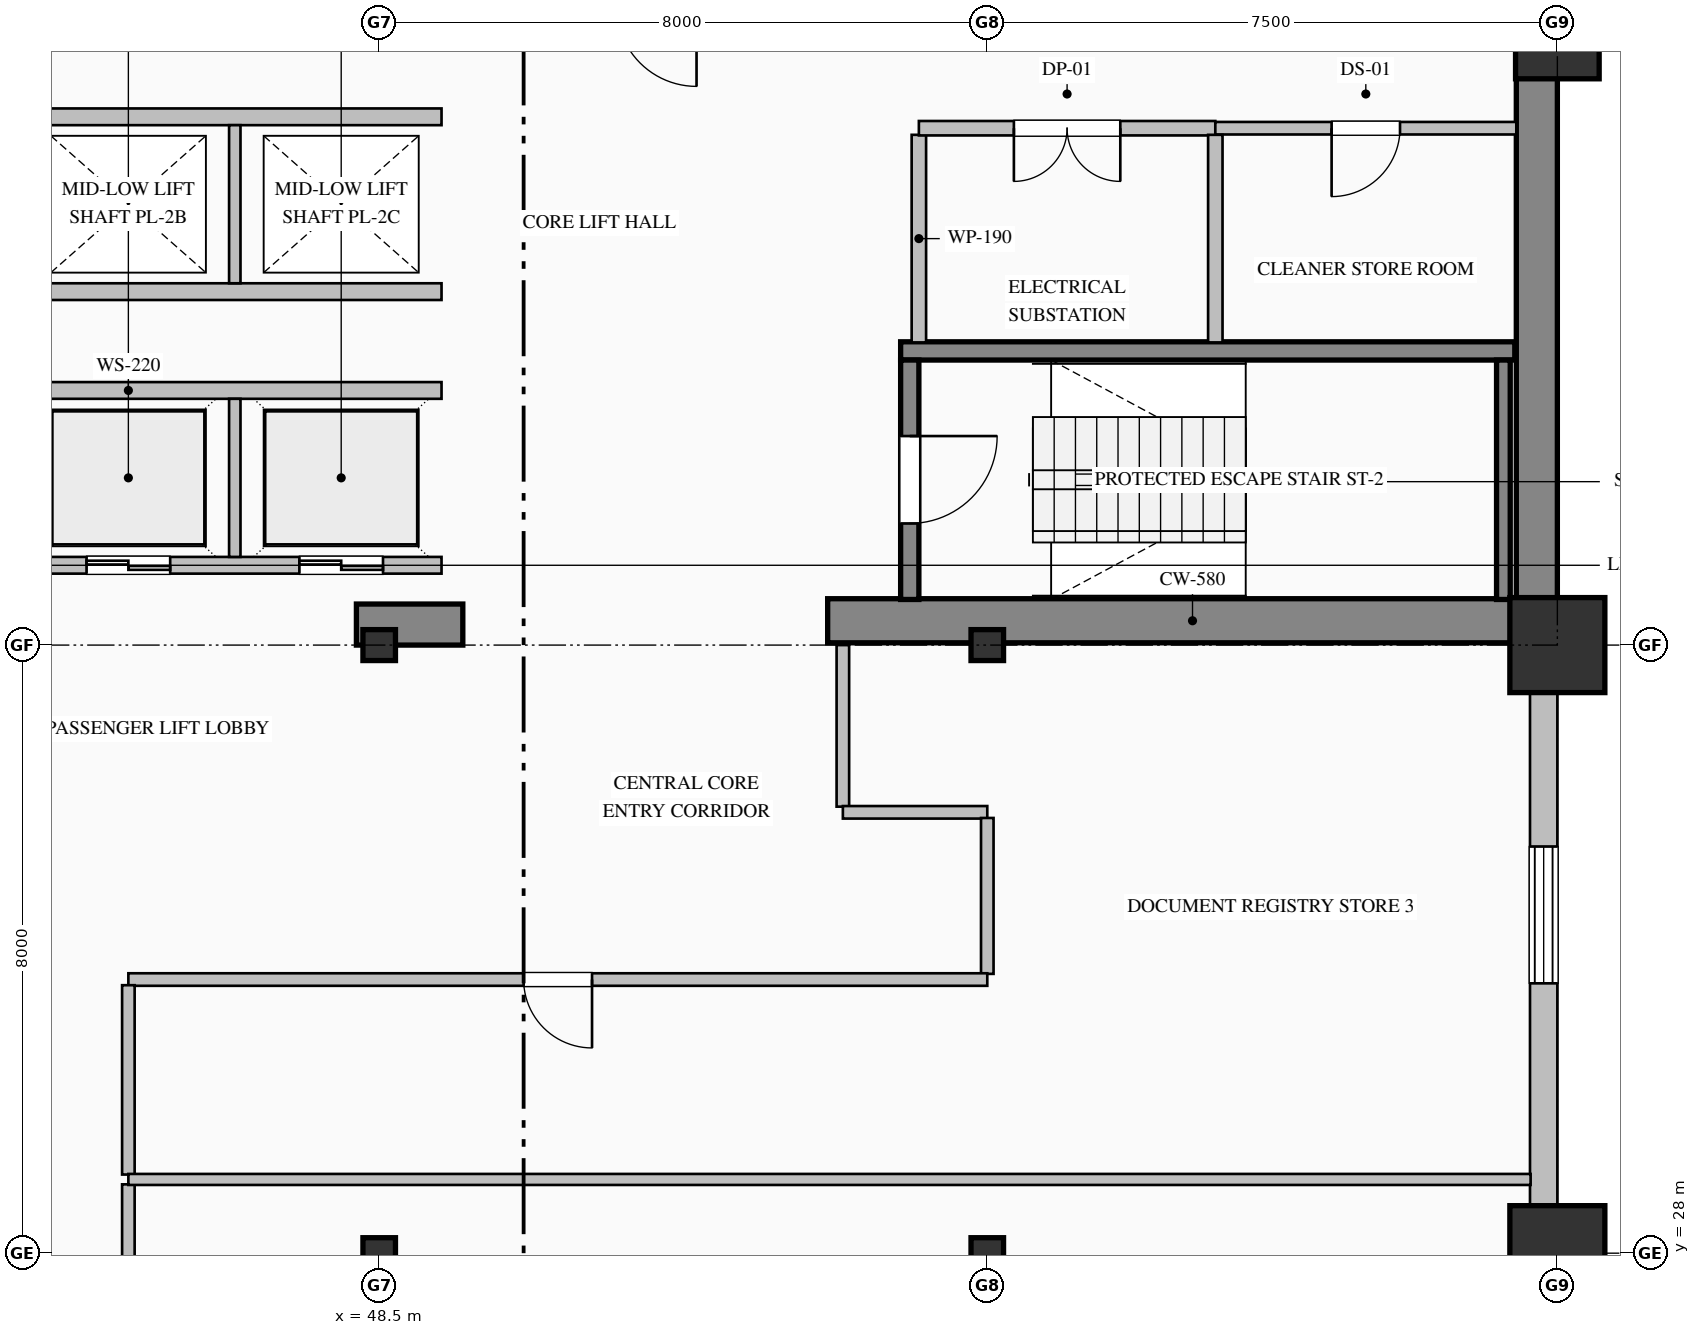
"""IFC4 building model, lengths in metres.
Left out: names, types, materials, properties, quantities, classifications, styles, units other than length and angle.
Written with IfcOpenShell. Run it as: python <this file> out.ifc"""

import sys

from ifc_helpers import new_model, si_unit, direction, frame, frame_2d, origin, origin_2d, place, context, subcontext, project, spatial, rectangle, hollow_rectangle, i_section, extrude, element, fill, save


model = new_model("IFC4")
c1 = context("Model", 3, precision=1e-05, world=origin(), true_north=direction((0.0, 1.0)))
c2 = subcontext(c1, "Body", "Model", "MODEL_VIEW")
j1 = project(units=[si_unit("LENGTHUNIT", "METRE"), si_unit("PLANEANGLEUNIT", "RADIAN")], contexts=[c1])
p1 = place(None, origin())
s1 = spatial("IfcSite", under=j1, at=p1, CompositionType="ELEMENT")
p2 = place(p1, origin())
s2 = spatial("IfcBuilding", under=s1, at=p2, CompositionType="ELEMENT")
p3 = place(p2, frame((0.0, 0.0, 100.2)))
s3 = spatial("IfcBuildingStorey", under=s2, at=p3, CompositionType="ELEMENT", Elevation=100.2)
p4 = place(p3, frame((63.73, 36.32, 0.0), z_axis=(0.0, 0.0, 1.0), x_axis=(0.0, 1.0, 0.0)))
e1 = element("IfcWall", 1, at=p4, inside=s3, PredefinedType="SHEAR", context=c2, shape_type="SweptSolid", body=[
    extrude(rectangle(XDim=15.14, YDim=0.54, at=frame_2d((7.57, 0.0))), origin(), (0.0, 0.0, 1.0), 3.75),
])
p5 = place(p3, frame((48.2, 36.27, 0.0), z_axis=(0.0, 0.0, 1.0), x_axis=(1.0, 0.0, 0.0)))
e2 = element("IfcWall", 2, at=p5, inside=s3, PredefinedType="SHEAR", context=c2, shape_type="SweptSolid", body=[
    extrude(rectangle(XDim=1.4, YDim=0.54, at=frame_2d((0.7, 0.0))), origin(), (0.0, 0.0, 1.0), 3.75),
])
p6 = place(p3, frame((54.4, 36.32, 0.0), z_axis=(0.0, 0.0, 1.0), x_axis=(1.0, 0.0, 0.0)))
e3 = element("IfcWall", 3, at=p6, inside=s3, PredefinedType="SHEAR", context=c2, shape_type="SweptSolid", body=[
    extrude(rectangle(XDim=9.6, YDim=0.58, at=frame_2d((4.8, 0.0))), origin(), (0.0, 0.0, 1.0), 4.0),
])
for number, where, z_axis, x_axis in (
    (4, (48.5, 28.0, 0.0), (0.0, 0.0, 1.0), (1.0, 0.0, 0.0)),
    (5, (48.5, 36.0, 0.0), (0.0, 0.0, 1.0), (1.0, 0.0, 0.0)),
    (6, (56.5, 28.0, 0.0), (0.0, 0.0, 1.0), (1.0, 0.0, 0.0)),
    (7, (56.5, 36.0, 0.0), (0.0, 0.0, 1.0), (1.0, 0.0, 0.0)),
):
    element("IfcColumn", number, at=place(p3, frame(where, z_axis=z_axis, x_axis=x_axis)), inside=s3, PredefinedType="COLUMN", context=c2, shape_type="SweptSolid", body=[
        extrude(i_section(OverallWidth=0.407, OverallDepth=0.428, WebThickness=0.02, FlangeThickness=0.035, FilletRadius=0.022, at=origin_2d()), origin(), (0.0, 0.0, 1.0), 4.0),
    ])
for number, where, z_axis, x_axis in (
    (8, (64.0, 28.0, 0.0), (0.0, 0.0, 1.0), (1.0, 0.0, 0.0)),
    (9, (64.0, 36.0, 0.0), (0.0, 0.0, 1.0), (1.0, 0.0, 0.0)),
):
    element("IfcColumn", number, at=place(p3, frame(where, z_axis=z_axis, x_axis=x_axis)), inside=s3, PredefinedType="COLUMN", context=c2, shape_type="SweptSolid", body=[
        extrude(hollow_rectangle(XDim=1.25, YDim=1.25, WallThickness=0.045, at=origin_2d()), origin(), (0.0, 0.0, 1.0), 4.0),
    ])
p7 = place(p3, frame((64.0, 44.0, 0.0), z_axis=(0.0, 0.0, 1.0), x_axis=(1.0, 0.0, 0.0)))
e10 = element("IfcColumn", 10, at=p7, inside=s3, PredefinedType="COLUMN", context=c2, shape_type="SweptSolid", body=[
    extrude(hollow_rectangle(XDim=1.1, YDim=1.1, WallThickness=0.04, at=origin_2d()), origin(), (0.0, 0.0, 1.0), 4.0),
])
p8 = place(p3, frame((63.82, 36.05, 0.0), z_axis=(0.0, 0.0, 1.0), x_axis=(0.0, -1.0, 0.0)))
e11 = element("IfcWall", 11, at=p8, inside=s3, PredefinedType="SOLIDWALL", context=c2, shape_type="SweptSolid", body=[
    extrude(rectangle(XDim=28.05, YDim=0.36, at=frame_2d((14.025, 0.0))), origin(), (0.0, 0.0, 1.0), 3.25),
])
p9 = place(p8, frame((2.7, 0.0, 0.85)))
e12 = element("IfcOpeningElement", 12, at=p9, cuts=e11, PredefinedType="OPENING", context=c2, shape_type="SweptSolid", body=[
    extrude(rectangle(XDim=1.8, YDim=2.05, at=frame_2d((0.9, 1.025))), frame((0.0, 0.19, 0.0), z_axis=(0.0, -1.0, 0.0), x_axis=(1.0, 0.0, 0.0)), (0.0, 0.0, 1.0), 0.38),
])
p10 = place(p8, frame((9.6, 0.0, 0.8)))
e13 = element("IfcOpeningElement", 13, at=p10, cuts=e11, PredefinedType="OPENING", context=c2, shape_type="SweptSolid", body=[
    extrude(rectangle(XDim=2.4, YDim=2.15, at=frame_2d((1.2, 1.075))), frame((0.0, 0.19, 0.0), z_axis=(0.0, -1.0, 0.0), x_axis=(1.0, 0.0, 0.0)), (0.0, 0.0, 1.0), 0.38),
])
p11 = place(p3, frame((55.36, 39.87, 0.0), z_axis=(0.0, 0.0, 1.0), x_axis=(1.0, 0.0, 0.0)))
e14 = element("IfcWall", 14, at=p11, inside=s3, PredefinedType="SOLIDWALL", context=c2, shape_type="SweptSolid", body=[
    extrude(rectangle(XDim=8.08, YDim=0.24, at=frame_2d((4.04, 0.0))), origin(), (0.0, 0.0, 1.0), 4.0),
])
p12 = place(p3, frame((55.48, 39.75, 0.0), z_axis=(0.0, 0.0, 1.0), x_axis=(0.0, -1.0, 0.0)))
e15 = element("IfcWall", 15, at=p12, inside=s3, PredefinedType="SOLIDWALL", context=c2, shape_type="SweptSolid", body=[
    extrude(rectangle(XDim=3.15, YDim=0.24, at=frame_2d((1.575, 0.0))), origin(), (0.0, 0.0, 1.0), 4.0),
])
p13 = place(p12, frame((1.0, 0.0, 0.0)))
e16 = element("IfcOpeningElement", 16, at=p13, cuts=e15, PredefinedType="OPENING", context=c2, shape_type="SweptSolid", body=[
    extrude(rectangle(XDim=1.15, YDim=2.2, at=frame_2d((0.575, 1.1))), frame((0.0, 0.13, 0.0), z_axis=(0.0, -1.0, 0.0), x_axis=(1.0, 0.0, 0.0)), (0.0, 0.0, 1.0), 0.26),
])
p14 = place(p3, frame((63.29, 36.6, 0.0), z_axis=(0.0, 0.0, 1.0), x_axis=(0.0, 1.0, 0.0)))
e17 = element("IfcWall", 17, at=p14, inside=s3, PredefinedType="SOLIDWALL", context=c2, shape_type="SweptSolid", body=[
    extrude(rectangle(XDim=3.15, YDim=0.18, at=frame_2d((1.575, 0.0))), origin(), (0.0, 0.0, 1.0), 4.0),
])
p15 = place(p3, frame((49.32, 37.05, 0.0), z_axis=(0.0, 0.0, 1.0), x_axis=(-1.0, 0.0, 0.0)))
e18 = element("IfcWall", 18, at=p15, inside=s3, PredefinedType="PARTITIONING", context=c2, shape_type="SweptSolid", body=[
    extrude(rectangle(XDim=8.24, YDim=0.22, at=frame_2d((4.12, 0.0))), origin(), (0.0, 0.0, 1.0), 3.75),
])
p16 = place(p15, frame((6.37, 0.0, 0.0)))
e19 = element("IfcOpeningElement", 19, at=p16, cuts=e18, PredefinedType="OPENING", context=c2, shape_type="SweptSolid", body=[
    extrude(rectangle(XDim=1.1, YDim=2.2, at=frame_2d((0.55, 1.1))), frame((0.0, 0.12, 0.0), z_axis=(0.0, -1.0, 0.0), x_axis=(1.0, 0.0, 0.0)), (0.0, 0.0, 1.0), 0.24),
])
p17 = place(p15, frame((3.57, 0.0, 0.0)))
e20 = element("IfcOpeningElement", 20, at=p17, cuts=e18, PredefinedType="OPENING", context=c2, shape_type="SweptSolid", body=[
    extrude(rectangle(XDim=1.1, YDim=2.2, at=frame_2d((0.55, 1.1))), frame((0.0, 0.12, 0.0), z_axis=(0.0, -1.0, 0.0), x_axis=(1.0, 0.0, 0.0)), (0.0, 0.0, 1.0), 0.24),
])
p18 = place(p15, frame((0.77, 0.0, 0.0)))
e21 = element("IfcOpeningElement", 21, at=p18, cuts=e18, PredefinedType="OPENING", context=c2, shape_type="SweptSolid", body=[
    extrude(rectangle(XDim=1.1, YDim=2.2, at=frame_2d((0.55, 1.1))), frame((0.0, 0.12, 0.0), z_axis=(0.0, -1.0, 0.0), x_axis=(1.0, 0.0, 0.0)), (0.0, 0.0, 1.0), 0.24),
])
p19 = place(p3, frame((41.08, 39.35, 0.0), z_axis=(0.0, 0.0, 1.0), x_axis=(1.0, 0.0, 0.0)))
e22 = element("IfcWall", 22, at=p19, inside=s3, PredefinedType="PARTITIONING", context=c2, shape_type="SweptSolid", body=[
    extrude(rectangle(XDim=8.24, YDim=0.22, at=frame_2d((4.12, 0.0))), origin(), (0.0, 0.0, 1.0), 3.75),
])
p20 = place(p3, frame((46.6, 37.16, 0.0), z_axis=(0.0, 0.0, 1.0), x_axis=(0.0, 1.0, 0.0)))
e23 = element("IfcWall", 23, at=p20, inside=s3, PredefinedType="PARTITIONING", context=c2, shape_type="SweptSolid", body=[
    extrude(rectangle(XDim=2.08, YDim=0.15, at=frame_2d((1.04, 0.0))), origin(), (0.0, 0.0, 1.0), 3.75),
])
for number, where, z_axis, x_axis in (
    (24, (49.32, 40.65, 0.0), (0.0, 0.0, 1.0), (-1.0, 0.0, 0.0)),
    (25, (41.08, 42.95, 0.0), (0.0, 0.0, 1.0), (1.0, 0.0, 0.0)),
):
    element("IfcWall", number, at=place(p3, frame(where, z_axis=z_axis, x_axis=x_axis)), inside=s3, PredefinedType="PARTITIONING", context=c2, shape_type="SweptSolid", body=[
        extrude(rectangle(XDim=8.24, YDim=0.22, at=frame_2d((4.12, 0.0))), origin(), (0.0, 0.0, 1.0), 3.75),
    ])
p21 = place(p3, frame((46.6, 40.76, 0.0), z_axis=(0.0, 0.0, 1.0), x_axis=(0.0, 1.0, 0.0)))
e26 = element("IfcWall", 26, at=p21, inside=s3, PredefinedType="PARTITIONING", context=c2, shape_type="SweptSolid", body=[
    extrude(rectangle(XDim=2.08, YDim=0.15, at=frame_2d((1.04, 0.0))), origin(), (0.0, 0.0, 1.0), 3.75),
])
p22 = place(p3, frame((55.6, 42.713, 0.0), z_axis=(0.0, 0.0, 1.0), x_axis=(0.0, -1.0, 0.0)))
e27 = element("IfcWall", 27, at=p22, inside=s3, PredefinedType="PARTITIONING", context=c2, shape_type="SweptSolid", body=[
    extrude(rectangle(XDim=2.731, YDim=0.19, at=frame_2d((1.365, 0.0))), origin(), (0.0, 0.0, 1.0), 3.75),
])
p23 = place(p3, frame((59.5, 42.8, 0.0), z_axis=(0.0, 0.0, 1.0), x_axis=(-1.0, 0.0, 0.0)))
e28 = element("IfcWall", 28, at=p23, inside=s3, PredefinedType="PARTITIONING", context=c2, shape_type="SweptSolid", body=[
    extrude(rectangle(XDim=3.9, YDim=0.19, at=frame_2d((1.95, 0.0))), origin(), (0.0, 0.0, 1.0), 3.75),
])
p24 = place(p23, frame((1.25, 0.0, 0.0)))
e29 = element("IfcOpeningElement", 29, at=p24, cuts=e28, PredefinedType="OPENING", context=c2, shape_type="SweptSolid", body=[
    extrude(rectangle(XDim=1.4, YDim=2.25, at=frame_2d((0.7, 1.125))), frame((0.0, 0.105, 0.0), z_axis=(0.0, -1.0, 0.0), x_axis=(1.0, 0.0, 0.0)), (0.0, 0.0, 1.0), 0.21),
])
p25 = place(p3, frame((63.46, 42.8, 0.0), z_axis=(0.0, 0.0, 1.0), x_axis=(-1.0, 0.0, 0.0)))
e30 = element("IfcWall", 30, at=p25, inside=s3, PredefinedType="PARTITIONING", context=c2, shape_type="SweptSolid", body=[
    extrude(rectangle(XDim=3.96, YDim=0.165, at=frame_2d((1.98, 0.0))), origin(), (0.0, 0.0, 1.0), 3.75),
])
p26 = place(p25, frame((1.53, 0.0, 0.0)))
e31 = element("IfcOpeningElement", 31, at=p26, cuts=e30, PredefinedType="OPENING", context=c2, shape_type="SweptSolid", body=[
    extrude(rectangle(XDim=0.9, YDim=2.15, at=frame_2d((0.45, 1.075))), frame((0.0, 0.093, 0.0), z_axis=(0.0, -1.0, 0.0), x_axis=(1.0, 0.0, 0.0)), (0.0, 0.0, 1.0), 0.185),
])
p27 = place(p3, frame((59.5, 42.713, 0.0), z_axis=(0.0, 0.0, 1.0), x_axis=(0.0, -1.0, 0.0)))
e32 = element("IfcWall", 32, at=p27, inside=s3, PredefinedType="PARTITIONING", context=c2, shape_type="SweptSolid", body=[
    extrude(rectangle(XDim=2.731, YDim=0.19, at=frame_2d((1.365, 0.0))), origin(), (0.0, 0.0, 1.0), 3.75),
])
p28 = place(p3, frame((54.6, 36.0, 0.0), z_axis=(0.0, 0.0, 1.0), x_axis=(0.0, -1.0, 0.0)))
e33 = element("IfcWall", 33, at=p28, inside=s3, PredefinedType="PARTITIONING", context=c2, shape_type="SweptSolid", body=[
    extrude(rectangle(XDim=2.125, YDim=0.165, at=frame_2d((1.063, 0.0))), origin(), (0.0, 0.0, 1.0), 3.75),
])
p29 = place(p3, frame((54.6, 33.8, 0.0), z_axis=(0.0, 0.0, 1.0), x_axis=(1.0, 0.0, 0.0)))
e34 = element("IfcWall", 34, at=p29, inside=s3, PredefinedType="PARTITIONING", context=c2, shape_type="SweptSolid", body=[
    extrude(rectangle(XDim=1.9, YDim=0.165, at=frame_2d((0.95, 0.0))), origin(), (0.0, 0.0, 1.0), 3.75),
])
p30 = place(p3, frame((56.5, 33.726, 0.0), z_axis=(0.0, 0.0, 1.0), x_axis=(0.0, -1.0, 0.0)))
e35 = element("IfcWall", 35, at=p30, inside=s3, PredefinedType="PARTITIONING", context=c2, shape_type="SweptSolid", body=[
    extrude(rectangle(XDim=2.051, YDim=0.165, at=frame_2d((1.025, 0.0))), origin(), (0.0, 0.0, 1.0), 3.042),
])
p31 = place(p3, frame((56.5, 31.6, 0.0), z_axis=(0.0, 0.0, 1.0), x_axis=(-1.0, 0.0, 0.0)))
e36 = element("IfcWall", 36, at=p31, inside=s3, PredefinedType="PARTITIONING", context=c2, shape_type="SweptSolid", body=[
    extrude(rectangle(XDim=11.3, YDim=0.165, at=frame_2d((5.65, 0.0))), origin(), (0.0, 0.0, 1.0), 3.75),
])
p32 = place(p31, frame((5.2, 0.0, 0.0)))
e37 = element("IfcOpeningElement", 37, at=p32, cuts=e36, PredefinedType="OPENING", context=c2, shape_type="SweptSolid", body=[
    extrude(rectangle(XDim=0.9, YDim=2.15, at=frame_2d((0.45, 1.075))), frame((0.0, 0.093, 0.0), z_axis=(0.0, -1.0, 0.0), x_axis=(1.0, 0.0, 0.0)), (0.0, 0.0, 1.0), 0.185),
])
p33 = place(p3, frame((45.2, 28.906, 0.0), z_axis=(0.0, 0.0, 1.0), x_axis=(0.0, -1.0, 0.0)))
e38 = element("IfcWall", 38, at=p33, inside=s3, PredefinedType="PARTITIONING", context=c2, shape_type="SweptSolid", body=[
    extrude(rectangle(XDim=6.901, YDim=0.165, at=frame_2d((3.451, 0.0))), origin(), (0.0, 0.0, 1.0), 3.75),
])
p34 = place(p33, frame((3.0, 0.0, 0.0)))
e39 = element("IfcOpeningElement", 39, at=p34, cuts=e38, PredefinedType="OPENING", context=c2, shape_type="SweptSolid", body=[
    extrude(rectangle(XDim=0.9, YDim=2.15, at=frame_2d((0.45, 1.075))), frame((0.0, 0.093, 0.0), z_axis=(0.0, -1.0, 0.0), x_axis=(1.0, 0.0, 0.0)), (0.0, 0.0, 1.0), 0.185),
])
p35 = place(p3, frame((45.2, 31.525, 0.0), z_axis=(0.0, 0.0, 1.0), x_axis=(0.0, -1.0, 0.0)))
e40 = element("IfcWall", 40, at=p35, inside=s3, PredefinedType="PARTITIONING", context=c2, shape_type="SweptSolid", body=[
    extrude(rectangle(XDim=2.491, YDim=0.165, at=frame_2d((1.246, 0.0))), origin(), (0.0, 0.0, 1.0), 3.75),
])
p36 = place(p3, frame((45.2, 28.97, 0.0), z_axis=(0.0, 0.0, 1.0), x_axis=(1.0, 0.0, 0.0)))
e41 = element("IfcWall", 41, at=p36, inside=s3, PredefinedType="PARTITIONING", context=c2, shape_type="SweptSolid", body=[
    extrude(rectangle(XDim=18.448, YDim=0.145, at=frame_2d((9.224, 0.0))), origin(), (0.0, 0.0, 1.0), 3.75),
])
p37 = place(p9, origin())
e42 = element("IfcWindow", 42, at=p37, inside=s3, PartitioningType="TRIPLE_PANEL_VERTICAL", PredefinedType="WINDOW", context=c2, shape_type="SweptSolid", body=[
    extrude(rectangle(XDim=1.8, YDim=2.05, at=frame_2d((0.9, 1.025))), frame((0.0, 0.15, 0.0), z_axis=(0.0, -1.0, 0.0), x_axis=(1.0, 0.0, 0.0)), (0.0, 0.0, 1.0), 0.06),
])
fill(e12, e42)
p38 = place(p13, origin())
e43 = element("IfcDoor", 43, at=p38, inside=s3, OperationType="SINGLE_SWING_LEFT", PredefinedType="DOOR", context=c2, shape_type="SweptSolid", body=[
    extrude(rectangle(XDim=1.15, YDim=2.2, at=frame_2d((0.575, 1.1))), frame((0.0, 0.025, 0.0), z_axis=(0.0, -1.0, 0.0), x_axis=(1.0, 0.0, 0.0)), (0.0, 0.0, 1.0), 0.05),
])
fill(e16, e43)
p39 = place(p17, origin())
e44 = element("IfcDoor", 44, at=p39, inside=s3, OperationType="DOUBLE_DOOR_SLIDING", PredefinedType="DOOR", context=c2, shape_type="SweptSolid", body=[
    extrude(rectangle(XDim=1.1, YDim=2.2, at=frame_2d((0.55, 1.1))), frame((0.0, 0.025, 0.0), z_axis=(0.0, -1.0, 0.0), x_axis=(1.0, 0.0, 0.0)), (0.0, 0.0, 1.0), 0.05),
])
fill(e20, e44)
p40 = place(p18, origin())
e45 = element("IfcDoor", 45, at=p40, inside=s3, OperationType="DOUBLE_DOOR_SLIDING", PredefinedType="DOOR", context=c2, shape_type="SweptSolid", body=[
    extrude(rectangle(XDim=1.1, YDim=2.2, at=frame_2d((0.55, 1.1))), frame((0.0, 0.025, 0.0), z_axis=(0.0, -1.0, 0.0), x_axis=(1.0, 0.0, 0.0)), (0.0, 0.0, 1.0), 0.05),
])
fill(e21, e45)
p41 = place(p24, origin())
e46 = element("IfcDoor", 46, at=p41, inside=s3, OperationType="DOUBLE_DOOR_SINGLE_SWING", PredefinedType="DOOR", context=c2, shape_type="SweptSolid", body=[
    extrude(rectangle(XDim=1.4, YDim=2.25, at=frame_2d((0.7, 1.125))), frame((0.0, 0.025, 0.0), z_axis=(0.0, -1.0, 0.0), x_axis=(1.0, 0.0, 0.0)), (0.0, 0.0, 1.0), 0.05),
])
fill(e29, e46)
p42 = place(p26, origin())
e47 = element("IfcDoor", 47, at=p42, inside=s3, OperationType="SINGLE_SWING_RIGHT", PredefinedType="DOOR", context=c2, shape_type="SweptSolid", body=[
    extrude(rectangle(XDim=0.9, YDim=2.15, at=frame_2d((0.45, 1.075))), frame((0.0, 0.025, 0.0), z_axis=(0.0, -1.0, 0.0), x_axis=(1.0, 0.0, 0.0)), (0.0, 0.0, 1.0), 0.05),
])
fill(e31, e47)
p43 = place(p32, origin())
e48 = element("IfcDoor", 48, at=p43, inside=s3, OperationType="SINGLE_SWING_LEFT", PredefinedType="DOOR", context=c2, shape_type="SweptSolid", body=[
    extrude(rectangle(XDim=0.9, YDim=2.15, at=frame_2d((0.45, 1.075))), frame((0.0, 0.025, 0.0), z_axis=(0.0, -1.0, 0.0), x_axis=(1.0, 0.0, 0.0)), (0.0, 0.0, 1.0), 0.05),
])
fill(e37, e48)
save(model, sys.argv[1])
